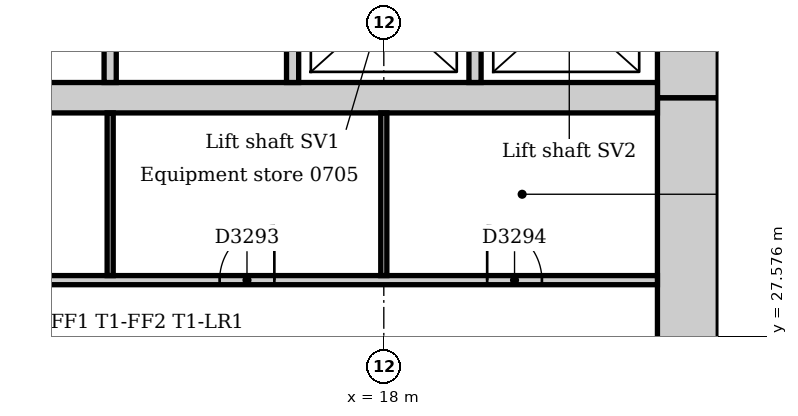
"""IFC4 building model, lengths in metres.
Left out: names, types, materials, properties, quantities, classifications, styles, units other than length and angle.
Written with IfcOpenShell. Run it as: python <this file> out.ifc"""

import sys

from ifc_helpers import new_model, si_unit, direction, frame, frame_2d, origin, place, context, subcontext, project, spatial, rectangle, extrude, element, fill, save


model = new_model("IFC4")
c1 = context("Model", 3, precision=1e-05, world=origin(), true_north=direction((0.0, 1.0)))
c2 = subcontext(c1, "Body", "Model", "MODEL_VIEW")
j1 = project(units=[si_unit("LENGTHUNIT", "METRE"), si_unit("PLANEANGLEUNIT", "RADIAN")], contexts=[c1])
p1 = place(None, origin())
s1 = spatial("IfcSite", under=j1, at=p1, CompositionType="ELEMENT")
p2 = place(p1, origin())
s2 = spatial("IfcBuilding", under=s1, at=p2, CompositionType="ELEMENT")
p3 = place(p2, frame((0.0, 0.0, 34.0)))
s3 = spatial("IfcBuildingStorey", under=s2, at=p3, CompositionType="ELEMENT", Elevation=34.0)
p4 = place(p3, frame((23.0, 21.0, 0.0), z_axis=(0.0, 0.0, 1.0), x_axis=(0.0, 1.0, 0.0)))
e1 = element("IfcWall", 1, at=p4, inside=s3, PredefinedType="SOLIDWALL", context=c2, shape_type="SweptSolid", body=[
    extrude(rectangle(XDim=10.5, YDim=1.0, at=frame_2d((5.25, 0.0))), origin(), (0.0, 0.0, 1.0), 4.0),
])
p5 = place(p4, frame((4.35, 0.0, 0.0)))
e2 = element("IfcOpeningElement", 2, at=p5, cuts=e1, PredefinedType="OPENING", context=c2, shape_type="SweptSolid", body=[
    extrude(rectangle(XDim=1.8, YDim=2.1, at=frame_2d((0.9, 1.05))), frame((0.0, 0.51, 0.0), z_axis=(0.0, -1.0, 0.0), x_axis=(1.0, 0.0, 0.0)), (0.0, 0.0, 1.0), 1.02),
])
p6 = place(p3, frame((23.0, 31.5, 0.0), z_axis=(0.0, 0.0, 1.0), x_axis=(0.0, 1.0, 0.0)))
e3 = element("IfcWall", 3, at=p6, inside=s3, PredefinedType="SOLIDWALL", context=c2, shape_type="SweptSolid", body=[
    extrude(rectangle(XDim=10.5, YDim=1.0, at=frame_2d((5.25, 0.0))), origin(), (0.0, 0.0, 1.0), 4.0),
])
p7 = place(p6, frame((3.15, 0.0, 0.0)))
e4 = element("IfcOpeningElement", 4, at=p7, cuts=e3, PredefinedType="OPENING", context=c2, shape_type="SweptSolid", body=[
    extrude(rectangle(XDim=1.0, YDim=2.1, at=frame_2d((0.5, 1.05))), frame((0.0, 0.51, 0.0), z_axis=(0.0, -1.0, 0.0), x_axis=(1.0, 0.0, 0.0)), (0.0, 0.0, 1.0), 1.02),
])
p8 = place(p6, frame((5.2, 0.0, 0.0)))
e5 = element("IfcOpeningElement", 5, at=p8, cuts=e3, PredefinedType="OPENING", context=c2, shape_type="SweptSolid", body=[
    extrude(rectangle(XDim=1.0, YDim=2.1, at=frame_2d((0.5, 1.05))), frame((0.0, 0.51, 0.0), z_axis=(0.0, -1.0, 0.0), x_axis=(1.0, 0.0, 0.0)), (0.0, 0.0, 1.0), 1.02),
])
p9 = place(p3, frame((4.5, 31.5, 0.0), z_axis=(0.0, 0.0, 1.0), x_axis=(1.0, 0.0, 0.0)))
e6 = element("IfcWall", 6, at=p9, inside=s3, PredefinedType="SOLIDWALL", context=c2, shape_type="SweptSolid", body=[
    extrude(rectangle(XDim=18.0, YDim=0.5, at=frame_2d((9.0, 0.0))), origin(), (0.0, 0.0, 1.0), 4.0),
])
for number, where, z_axis, x_axis in (
    (7, (13.5, 31.75, 0.0), (0.0, 0.0, 1.0), (0.0, 1.0, 0.0)),
    (8, (16.5, 31.75, 0.0), (0.0, 0.0, 1.0), (0.0, 1.0, 0.0)),
    (9, (19.5, 31.75, 0.0), (0.0, 0.0, 1.0), (0.0, 1.0, 0.0)),
):
    element("IfcWall", number, at=place(p3, frame(where, z_axis=z_axis, x_axis=x_axis)), inside=s3, PredefinedType="PARTITIONING", context=c2, shape_type="SweptSolid", body=[
        extrude(rectangle(XDim=2.65, YDim=0.2, at=frame_2d((1.325, 0.0))), origin(), (0.0, 0.0, 1.0), 3.85),
    ])
p10 = place(p3, frame((4.5, 28.5, 0.0), z_axis=(0.0, 0.0, 1.0), x_axis=(1.0, 0.0, 0.0)))
e10 = element("IfcWall", 10, at=p10, inside=s3, PredefinedType="PARTITIONING", context=c2, shape_type="SweptSolid", body=[
    extrude(rectangle(XDim=18.0, YDim=0.15, at=frame_2d((9.0, 0.0))), origin(), (0.0, 0.0, 1.0), 3.85),
])
p11 = place(p10, frame((4.1, 0.0, 0.0)))
e11 = element("IfcOpeningElement", 11, at=p11, cuts=e10, PredefinedType="OPENING", context=c2, shape_type="SweptSolid", body=[
    extrude(rectangle(XDim=0.9, YDim=2.1, at=frame_2d((0.45, 1.05))), frame((0.0, 0.085, 0.0), z_axis=(0.0, -1.0, 0.0), x_axis=(1.0, 0.0, 0.0)), (0.0, 0.0, 1.0), 0.17),
])
p12 = place(p10, frame((10.8, 0.0, 0.0)))
e12 = element("IfcOpeningElement", 12, at=p12, cuts=e10, PredefinedType="OPENING", context=c2, shape_type="SweptSolid", body=[
    extrude(rectangle(XDim=0.9, YDim=2.1, at=frame_2d((0.45, 1.05))), frame((0.0, 0.085, 0.0), z_axis=(0.0, -1.0, 0.0), x_axis=(1.0, 0.0, 0.0)), (0.0, 0.0, 1.0), 0.17),
])
p13 = place(p10, frame((15.2, 0.0, 0.0)))
e13 = element("IfcOpeningElement", 13, at=p13, cuts=e10, PredefinedType="OPENING", context=c2, shape_type="SweptSolid", body=[
    extrude(rectangle(XDim=0.9, YDim=2.1, at=frame_2d((0.45, 1.05))), frame((0.0, 0.085, 0.0), z_axis=(0.0, -1.0, 0.0), x_axis=(1.0, 0.0, 0.0)), (0.0, 0.0, 1.0), 0.17),
])
for number, where, z_axis, x_axis in (
    (14, (13.5, 28.575, 0.0), (0.0, 0.0, 1.0), (0.0, 1.0, 0.0)),
    (15, (18.0, 28.575, 0.0), (0.0, 0.0, 1.0), (0.0, 1.0, 0.0)),
):
    element("IfcWall", number, at=place(p3, frame(where, z_axis=z_axis, x_axis=x_axis)), inside=s3, PredefinedType="PARTITIONING", context=c2, shape_type="SweptSolid", body=[
        extrude(rectangle(XDim=2.675, YDim=0.1, at=frame_2d((1.337, 0.0))), origin(), (0.0, 0.0, 1.0), 3.85),
    ])
p14 = place(p12, origin())
e16 = element("IfcDoor", 16, at=p14, inside=s3, OperationType="SINGLE_SWING_RIGHT", PredefinedType="DOOR", context=c2, shape_type="SweptSolid", body=[
    extrude(rectangle(XDim=0.9, YDim=2.1, at=frame_2d((0.45, 1.05))), frame((0.0, 0.025, 0.0), z_axis=(0.0, -1.0, 0.0), x_axis=(1.0, 0.0, 0.0)), (0.0, 0.0, 1.0), 0.05),
])
fill(e12, e16)
p15 = place(p13, origin())
e17 = element("IfcDoor", 17, at=p15, inside=s3, OperationType="SINGLE_SWING_LEFT", PredefinedType="DOOR", context=c2, shape_type="SweptSolid", body=[
    extrude(rectangle(XDim=0.9, YDim=2.1, at=frame_2d((0.45, 1.05))), frame((0.0, 0.025, 0.0), z_axis=(0.0, -1.0, 0.0), x_axis=(1.0, 0.0, 0.0)), (0.0, 0.0, 1.0), 0.05),
])
fill(e13, e17)
save(model, sys.argv[1])
